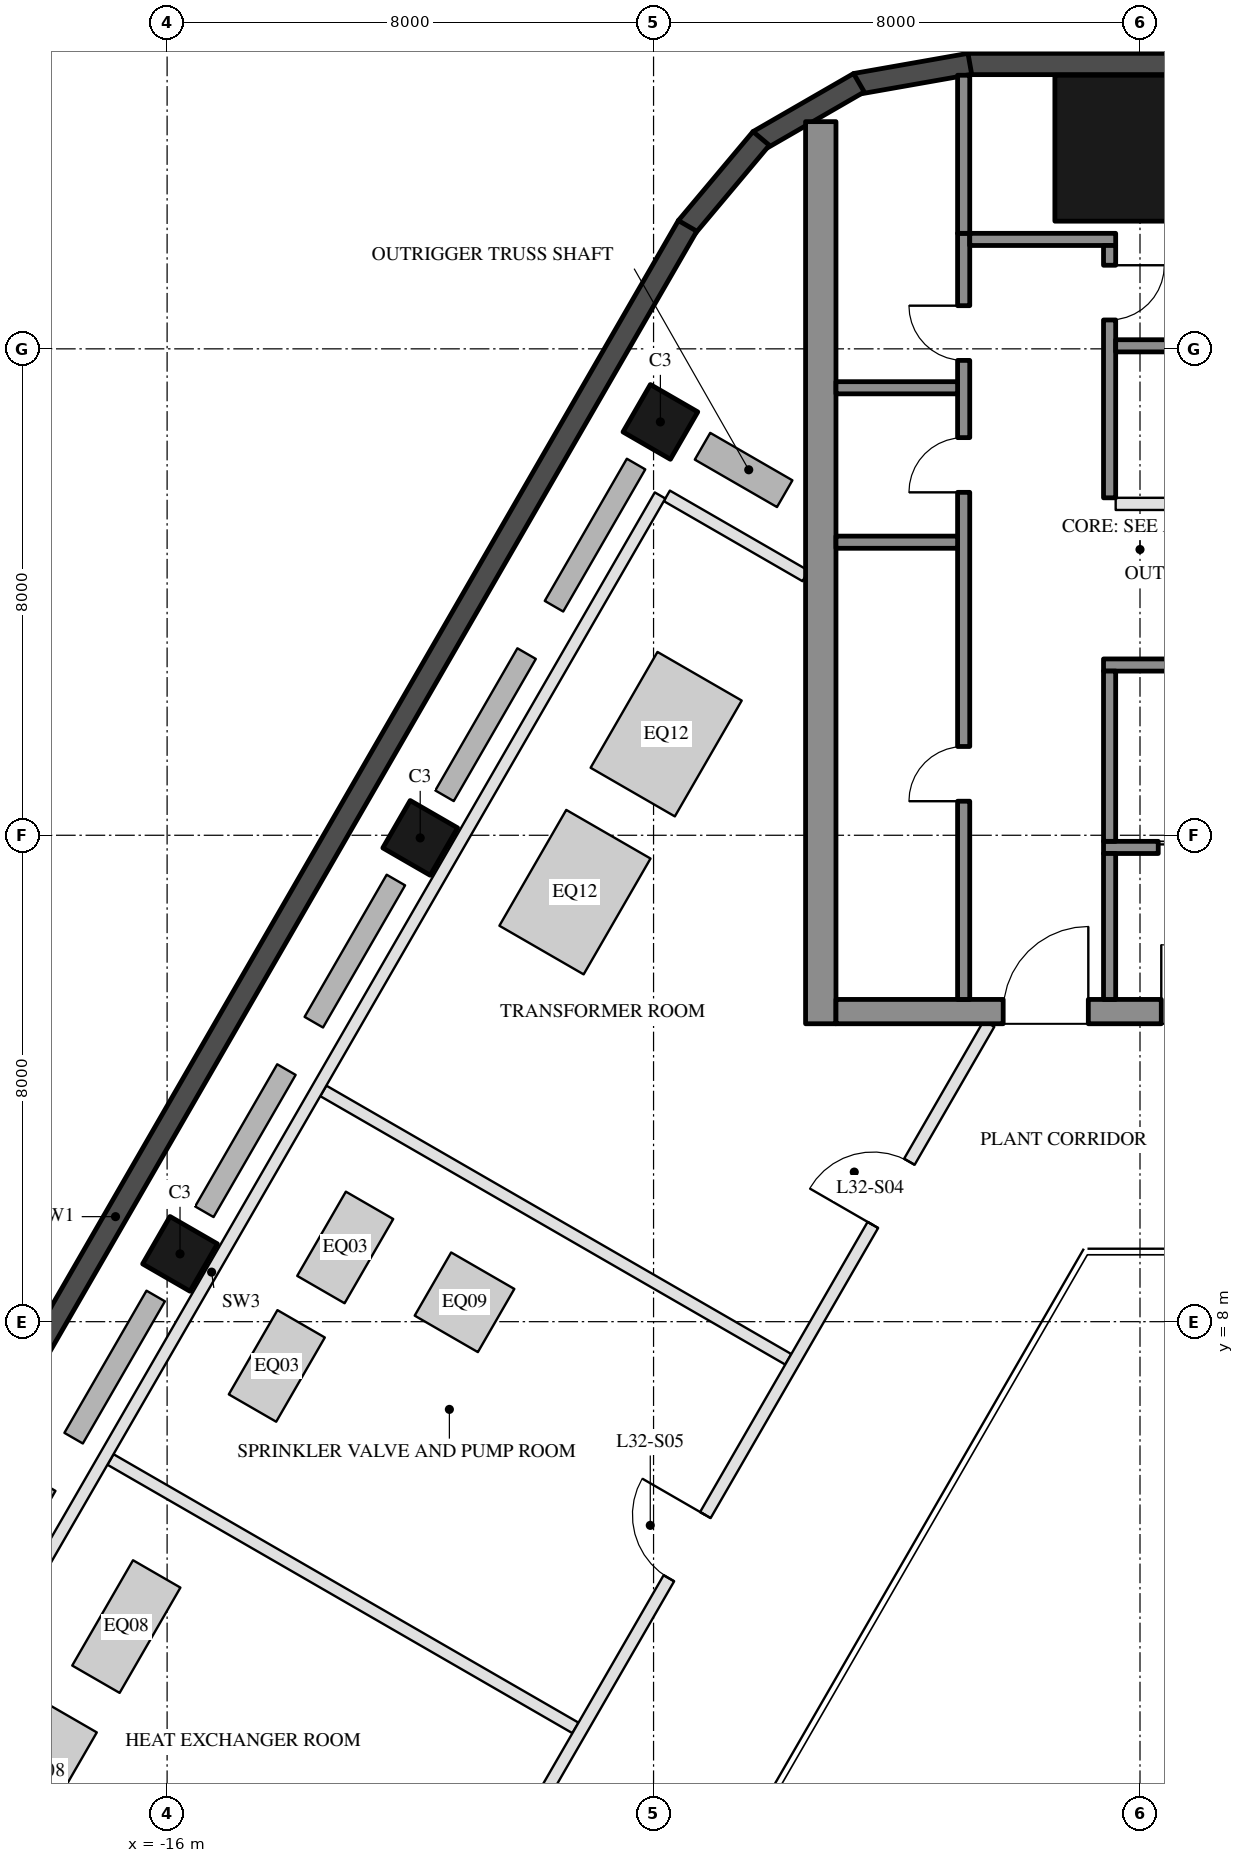
"""IFC4 building model, lengths in metres.
Left out: names, types, materials, properties, quantities, classifications, styles, units other than length and angle.
Written with IfcOpenShell. Run it as: python <this file> out.ifc"""

import sys

from ifc_helpers import new_model, si_unit, direction, frame, frame_2d, origin, origin_2d, place, context, subcontext, project, spatial, rectangle, hollow_rectangle, extrude, element, fill, save


model = new_model("IFC4")
c1 = context("Model", 3, precision=1e-05, world=origin(), true_north=direction((0.0, 1.0)))
c2 = subcontext(c1, "Body", "Model", "MODEL_VIEW")
j1 = project(units=[si_unit("LENGTHUNIT", "METRE"), si_unit("PLANEANGLEUNIT", "RADIAN")], contexts=[c1])
p1 = place(None, origin())
s1 = spatial("IfcSite", under=j1, at=p1, CompositionType="ELEMENT")
p2 = place(p1, origin())
s2 = spatial("IfcBuilding", under=s1, at=p2, CompositionType="ELEMENT")
p3 = place(p2, frame((0.0, 0.0, 137.6)))
s3 = spatial("IfcBuildingStorey", under=s2, at=p3, CompositionType="ELEMENT", Elevation=137.6)
for number, where, z_axis, x_axis in (
    (1, (-7.888, 22.798, 0.0), (0.0, 0.0, 1.0), (0.5, 0.866, 0.0)),
    (2, (-11.838, 15.957, 0.0), (0.0, 0.0, 1.0), (0.5, 0.866, 0.0)),
    (3, (-15.788, 9.115, 0.0), (0.0, 0.0, 1.0), (0.5, 0.866, 0.0)),
):
    element("IfcColumn", number, at=place(p3, frame(where, z_axis=z_axis, x_axis=x_axis)), inside=s3, PredefinedType="COLUMN", context=c2, shape_type="SweptSolid", body=[
        extrude(hollow_rectangle(XDim=0.9, YDim=0.9, WallThickness=0.04, at=origin_2d()), origin(), (0.0, 0.0, 1.0), 4.5),
    ])
p4 = place(p3, frame((0.0, 27.3, 0.0), z_axis=(0.0, 0.0, 1.0), x_axis=(1.0, 0.0, 0.0)))
e4 = element("IfcColumn", 4, at=p4, inside=s3, PredefinedType="COLUMN", context=c2, shape_type="SweptSolid", body=[
    extrude(hollow_rectangle(XDim=2.8, YDim=2.4, WallThickness=0.07, at=origin_2d()), origin(), (0.0, 0.0, 1.0), 4.5),
])
p5 = place(p3, frame((2.829, 28.685, 0.0), z_axis=(0.0, 0.0, 1.0), x_axis=(-1.0, 0.0, 0.0)))
e5 = element("IfcWall", 5, at=p5, inside=s3, PredefinedType="SOLIDWALL", context=c2, shape_type="SweptSolid", body=[
    extrude(rectangle(XDim=5.658, YDim=0.35, at=frame_2d((2.829, 0.0))), origin(), (0.0, 0.0, 1.0), 4.2),
])
for number, where, z_axis, x_axis in (
    (6, (-2.799, 28.688, 0.0), (0.0, 0.0, 1.0), (-0.985, -0.174, 0.0)),
    (7, (-4.623, 28.377, 0.0), (0.0, 0.0, 1.0), (-0.866, -0.5, 0.0)),
):
    element("IfcWall", number, at=place(p3, frame(where, z_axis=z_axis, x_axis=x_axis)), inside=s3, PredefinedType="SOLIDWALL", context=c2, shape_type="SweptSolid", body=[
        extrude(rectangle(XDim=1.91, YDim=0.35, at=frame_2d((0.955, 0.0))), origin(), (0.0, 0.0, 1.0), 4.2),
    ])
p6 = place(p3, frame((-6.23, 27.461, 0.0), z_axis=(0.0, 0.0, 1.0), x_axis=(-0.642808304945, -0.766027077259, 0.0)))
e8 = element("IfcWall", 8, at=p6, inside=s3, PredefinedType="SOLIDWALL", context=c2, shape_type="SweptSolid", body=[
    extrude(rectangle(XDim=1.91, YDim=0.35, at=frame_2d((0.955, 0.0))), origin(), (0.0, 0.0, 1.0), 4.2),
])
p7 = place(p3, frame((-7.441, 26.022, 0.0), z_axis=(0.0, 0.0, 1.0), x_axis=(-0.499998380999, -0.866026338513, 0.0)))
e9 = element("IfcWall", 9, at=p7, inside=s3, PredefinedType="SOLIDWALL", context=c2, shape_type="SweptSolid", body=[
    extrude(rectangle(XDim=37.631, YDim=0.35, at=frame_2d((18.816, 0.0))), origin(), (0.0, 0.0, 1.0), 4.2),
])
p8 = place(p3, frame((-5.25, 12.9, 0.0), z_axis=(0.0, 0.0, 1.0), x_axis=(0.0, 1.0, 0.0)))
e10 = element("IfcWall", 10, at=p8, inside=s3, PredefinedType="SHEAR", context=c2, shape_type="SweptSolid", body=[
    extrude(rectangle(XDim=14.837, YDim=0.5, at=frame_2d((7.418, 0.0))), origin(), (0.0, 0.0, 1.0), 4.2),
])
p9 = place(p3, frame((5.0, 13.1, 0.0), z_axis=(0.0, 0.0, 1.0), x_axis=(-1.0, 0.0, 0.0)))
e11 = element("IfcWall", 11, at=p9, inside=s3, PredefinedType="SHEAR", context=c2, shape_type="SweptSolid", body=[
    extrude(rectangle(XDim=10.0, YDim=0.4, at=frame_2d((5.0, 0.0))), origin(), (0.0, 0.0, 1.0), 4.2),
])
p10 = place(p9, frame((3.55, 0.0, 0.0)))
e12 = element("IfcOpeningElement", 12, at=p10, cuts=e11, PredefinedType="OPENING", context=c2, shape_type="SweptSolid", body=[
    extrude(rectangle(XDim=1.1, YDim=2.1, at=frame_2d((0.55, 1.05))), frame((0.0, 0.21, 0.0), z_axis=(0.0, -1.0, 0.0), x_axis=(1.0, 0.0, 0.0)), (0.0, 0.0, 1.0), 0.42),
])
p11 = place(p9, frame((5.85, 0.0, 0.0)))
e13 = element("IfcOpeningElement", 13, at=p11, cuts=e11, PredefinedType="OPENING", context=c2, shape_type="SweptSolid", body=[
    extrude(rectangle(XDim=1.4, YDim=2.1, at=frame_2d((0.7, 1.05))), frame((0.0, 0.21, 0.0), z_axis=(0.0, -1.0, 0.0), x_axis=(1.0, 0.0, 0.0)), (0.0, 0.0, 1.0), 0.42),
])
p12 = place(p3, frame((2.2, 18.8, 0.0), z_axis=(0.0, 0.0, 1.0), x_axis=(-1.0, 0.0, 0.0)))
e14 = element("IfcWall", 14, at=p12, inside=s3, PredefinedType="SHEAR", context=c2, shape_type="SweptSolid", body=[
    extrude(rectangle(XDim=2.8, YDim=0.2, at=frame_2d((1.4, 0.0))), origin(), (0.0, 0.0, 1.0), 4.2),
])
p13 = place(p3, frame((2.2, 15.8, 0.0), z_axis=(0.0, 0.0, 1.0), x_axis=(-1.0, 0.0, 0.0)))
e15 = element("IfcWall", 15, at=p13, inside=s3, PredefinedType="SHEAR", context=c2, shape_type="SweptSolid", body=[
    extrude(rectangle(XDim=2.8, YDim=0.2, at=frame_2d((1.4, 0.0))), origin(), (0.0, 0.0, 1.0), 4.2),
])
p14 = place(p13, frame((0.7, 0.0, 0.0)))
e16 = element("IfcOpeningElement", 16, at=p14, cuts=e15, PredefinedType="OPENING", context=c2, shape_type="SweptSolid", body=[
    extrude(rectangle(XDim=1.2, YDim=2.1, at=frame_2d((0.6, 1.05))), frame((0.0, 0.11, 0.0), z_axis=(0.0, -1.0, 0.0), x_axis=(1.0, 0.0, 0.0)), (0.0, 0.0, 1.0), 0.22),
])
p15 = place(p3, frame((-0.5, 15.9, 0.0), z_axis=(0.0, 0.0, 1.0), x_axis=(0.0, 1.0, 0.0)))
e17 = element("IfcWall", 17, at=p15, inside=s3, PredefinedType="SHEAR", context=c2, shape_type="SweptSolid", body=[
    extrude(rectangle(XDim=2.8, YDim=0.2, at=frame_2d((1.4, 0.0))), origin(), (0.0, 0.0, 1.0), 4.2),
])
p16 = place(p3, frame((-0.5, 13.3, 0.0), z_axis=(0.0, 0.0, 1.0), x_axis=(0.0, 1.0, 0.0)))
e18 = element("IfcWall", 18, at=p16, inside=s3, PredefinedType="SHEAR", context=c2, shape_type="SweptSolid", body=[
    extrude(rectangle(XDim=2.4, YDim=0.2, at=frame_2d((1.2, 0.0))), origin(), (0.0, 0.0, 1.0), 4.2),
])
p17 = place(p3, frame((-2.9, 13.3, 0.0), z_axis=(0.0, 0.0, 1.0), x_axis=(0.0, 1.0, 0.0)))
e19 = element("IfcWall", 19, at=p17, inside=s3, PredefinedType="SHEAR", context=c2, shape_type="SweptSolid", body=[
    extrude(rectangle(XDim=12.6, YDim=0.2, at=frame_2d((6.3, 0.0))), origin(), (0.0, 0.0, 1.0), 4.2),
])
p18 = place(p17, frame((3.26, 0.0, 0.0)))
e20 = element("IfcOpeningElement", 20, at=p18, cuts=e19, PredefinedType="OPENING", context=c2, shape_type="SweptSolid", body=[
    extrude(rectangle(XDim=0.9, YDim=2.1, at=frame_2d((0.45, 1.05))), frame((0.0, 0.11, 0.0), z_axis=(0.0, -1.0, 0.0), x_axis=(1.0, 0.0, 0.0)), (0.0, 0.0, 1.0), 0.22),
])
p19 = place(p17, frame((8.34, 0.0, 0.0)))
e21 = element("IfcOpeningElement", 21, at=p19, cuts=e19, PredefinedType="OPENING", context=c2, shape_type="SweptSolid", body=[
    extrude(rectangle(XDim=0.9, YDim=2.1, at=frame_2d((0.45, 1.05))), frame((0.0, 0.11, 0.0), z_axis=(0.0, -1.0, 0.0), x_axis=(1.0, 0.0, 0.0)), (0.0, 0.0, 1.0), 0.22),
])
p20 = place(p17, frame((10.51, 0.0, 0.0)))
e22 = element("IfcOpeningElement", 22, at=p20, cuts=e19, PredefinedType="OPENING", context=c2, shape_type="SweptSolid", body=[
    extrude(rectangle(XDim=0.9, YDim=2.1, at=frame_2d((0.45, 1.05))), frame((0.0, 0.11, 0.0), z_axis=(0.0, -1.0, 0.0), x_axis=(1.0, 0.0, 0.0)), (0.0, 0.0, 1.0), 0.22),
])
p21 = place(p3, frame((-0.4, 25.8, 0.0), z_axis=(0.0, 0.0, 1.0), x_axis=(-1.0, 0.0, 0.0)))
e23 = element("IfcWall", 23, at=p21, inside=s3, PredefinedType="SHEAR", context=c2, shape_type="SweptSolid", body=[
    extrude(rectangle(XDim=2.4, YDim=0.2, at=frame_2d((1.2, 0.0))), origin(), (0.0, 0.0, 1.0), 4.2),
])
p22 = place(p3, frame((-0.5, 21.55, 0.0), z_axis=(0.0, 0.0, 1.0), x_axis=(0.0, 1.0, 0.0)))
e24 = element("IfcWall", 24, at=p22, inside=s3, PredefinedType="SHEAR", context=c2, shape_type="SweptSolid", body=[
    extrude(rectangle(XDim=4.15, YDim=0.2, at=frame_2d((2.075, 0.0))), origin(), (0.0, 0.0, 1.0), 4.2),
])
p23 = place(p22, frame((2.925, 0.0, 0.0)))
e25 = element("IfcOpeningElement", 25, at=p23, cuts=e24, PredefinedType="OPENING", context=c2, shape_type="SweptSolid", body=[
    extrude(rectangle(XDim=0.9, YDim=2.1, at=frame_2d((0.45, 1.05))), frame((0.0, 0.11, 0.0), z_axis=(0.0, -1.0, 0.0), x_axis=(1.0, 0.0, 0.0)), (0.0, 0.0, 1.0), 0.22),
])
for number, where, z_axis, x_axis in (
    (26, (-3.0, 20.82, 0.0), (0.0, 0.0, 1.0), (-1.0, 0.0, 0.0)),
    (27, (-3.0, 23.36, 0.0), (0.0, 0.0, 1.0), (-1.0, 0.0, 0.0)),
):
    element("IfcWall", number, at=place(p3, frame(where, z_axis=z_axis, x_axis=x_axis)), inside=s3, PredefinedType="SHEAR", context=c2, shape_type="SweptSolid", body=[
        extrude(rectangle(XDim=2.0, YDim=0.2, at=frame_2d((1.0, 0.0))), origin(), (0.0, 0.0, 1.0), 4.2),
    ])
p24 = place(p3, frame((-2.9, 25.9, 0.0), z_axis=(0.0, 0.0, 1.0), x_axis=(0.0, 1.0, 0.0)))
e28 = element("IfcWall", 28, at=p24, inside=s3, PredefinedType="SHEAR", context=c2, shape_type="SweptSolid", body=[
    extrude(rectangle(XDim=2.6, YDim=0.2, at=frame_2d((1.3, 0.0))), origin(), (0.0, 0.0, 1.0), 4.2),
])
p25 = place(p3, frame((2.4, 24.05, 0.0), z_axis=(0.0, 0.0, 1.0), x_axis=(-1.0, 0.0, 0.0)))
e29 = element("IfcWall", 29, at=p25, inside=s3, PredefinedType="SHEAR", context=c2, shape_type="SweptSolid", body=[
    extrude(rectangle(XDim=2.8, YDim=0.2, at=frame_2d((1.4, 0.0))), origin(), (0.0, 0.0, 1.0), 4.2),
])
p26 = place(p3, frame((2.4, 21.45, 0.0), z_axis=(0.0, 0.0, 1.0), x_axis=(-1.0, 0.0, 0.0)))
e30 = element("IfcWall", 30, at=p26, inside=s3, PredefinedType="PARTITIONING", context=c2, shape_type="SweptSolid", body=[
    extrude(rectangle(XDim=2.8, YDim=0.2, at=frame_2d((1.4, 0.0))), origin(), (0.0, 0.0, 1.0), 4.2),
])
p27 = place(p3, frame((-7.781, 21.582, 0.0), z_axis=(0.0, 0.0, 1.0), x_axis=(0.865998849027, -0.500045991369, 0.0)))
e31 = element("IfcWall", 31, at=p27, inside=s3, PredefinedType="PARTITIONING", context=c2, shape_type="SweptSolid", body=[
    extrude(rectangle(XDim=2.635, YDim=0.2, at=frame_2d((1.317, 0.0))), origin(), (0.0, 0.0, 1.0), 4.2),
])
for number, where, z_axis, x_axis in (
    (32, (-13.431, 11.796, 0.0), (0.0, 0.0, 1.0), (0.866, -0.5, 0.0)),
    (33, (-16.931, 5.734, 0.0), (0.0, 0.0, 1.0), (0.866, -0.5, 0.0)),
):
    element("IfcWall", number, at=place(p3, frame(where, z_axis=z_axis, x_axis=x_axis)), inside=s3, PredefinedType="PARTITIONING", context=c2, shape_type="SweptSolid", body=[
        extrude(rectangle(XDim=8.83, YDim=0.2, at=frame_2d((4.415, 0.0))), origin(), (0.0, 0.0, 1.0), 4.2),
    ])
p28 = place(p3, frame((-7.893, 21.589, 0.0), z_axis=(0.0, 0.0, 1.0), x_axis=(-0.499998500593, -0.866026269466, 0.0)))
e34 = element("IfcWall", 34, at=p28, inside=s3, PredefinedType="PARTITIONING", context=c2, shape_type="SweptSolid", body=[
    extrude(rectangle(XDim=29.5, YDim=0.2, at=frame_2d((14.75, 0.0))), origin(), (0.0, 0.0, 1.0), 3.41),
])
p29 = place(p3, frame((-2.482, 12.9, 0.0), z_axis=(0.0, 0.0, 1.0), x_axis=(-0.50000478328, -0.866022642139, 0.0)))
e35 = element("IfcWall", 35, at=p29, inside=s3, PredefinedType="PARTITIONING", context=c2, shape_type="SweptSolid", body=[
    extrude(rectangle(XDim=19.861, YDim=0.2, at=frame_2d((9.931, 0.0))), origin(), (0.0, 0.0, 1.0), 3.41),
])
p30 = place(p29, frame((2.621, 0.0, 0.0)))
e36 = element("IfcOpeningElement", 36, at=p30, cuts=e35, PredefinedType="OPENING", context=c2, shape_type="SweptSolid", body=[
    extrude(rectangle(XDim=1.2, YDim=2.1, at=frame_2d((0.6, 1.05))), frame((0.0, 0.11, 0.0), z_axis=(0.0, -1.0, 0.0), x_axis=(1.0, 0.0, 0.0)), (0.0, 0.0, 1.0), 0.22),
])
p31 = place(p29, frame((9.331, 0.0, 0.0)))
e37 = element("IfcOpeningElement", 37, at=p31, cuts=e35, PredefinedType="OPENING", context=c2, shape_type="SweptSolid", body=[
    extrude(rectangle(XDim=1.2, YDim=2.1, at=frame_2d((0.6, 1.05))), frame((0.0, 0.11, 0.0), z_axis=(0.0, -1.0, 0.0), x_axis=(1.0, 0.0, 0.0)), (0.0, 0.0, 1.0), 0.22),
])
p32 = place(p29, frame((16.04, 0.0, 0.0)))
e38 = element("IfcOpeningElement", 38, at=p32, cuts=e35, PredefinedType="OPENING", context=c2, shape_type="SweptSolid", body=[
    extrude(rectangle(XDim=1.2, YDim=2.1, at=frame_2d((0.6, 1.05))), frame((0.0, 0.11, 0.0), z_axis=(0.0, -1.0, 0.0), x_axis=(1.0, 0.0, 0.0)), (0.0, 0.0, 1.0), 0.22),
])
p33 = place(p14, origin())
e39 = element("IfcDoor", 39, at=p33, inside=s3, OperationType="DOUBLE_DOOR_SLIDING", PredefinedType="DOOR", context=c2, shape_type="SweptSolid", body=[
    extrude(rectangle(XDim=1.2, YDim=2.1, at=frame_2d((0.6, 1.05))), frame((0.0, 0.025, 0.0), z_axis=(0.0, -1.0, 0.0), x_axis=(1.0, 0.0, 0.0)), (0.0, 0.0, 1.0), 0.05),
])
fill(e16, e39)
p34 = place(p18, origin())
e40 = element("IfcDoor", 40, at=p34, inside=s3, OperationType="SINGLE_SWING_LEFT", PredefinedType="DOOR", context=c2, shape_type="SweptSolid", body=[
    extrude(rectangle(XDim=0.9, YDim=2.1, at=frame_2d((0.45, 1.05))), frame((0.0, 0.025, 0.0), z_axis=(0.0, -1.0, 0.0), x_axis=(1.0, 0.0, 0.0)), (0.0, 0.0, 1.0), 0.05),
])
fill(e20, e40)
p35 = place(p19, origin())
e41 = element("IfcDoor", 41, at=p35, inside=s3, OperationType="SINGLE_SWING_LEFT", PredefinedType="DOOR", context=c2, shape_type="SweptSolid", body=[
    extrude(rectangle(XDim=0.9, YDim=2.1, at=frame_2d((0.45, 1.05))), frame((0.0, 0.025, 0.0), z_axis=(0.0, -1.0, 0.0), x_axis=(1.0, 0.0, 0.0)), (0.0, 0.0, 1.0), 0.05),
])
fill(e21, e41)
p36 = place(p20, origin())
e42 = element("IfcDoor", 42, at=p36, inside=s3, OperationType="SINGLE_SWING_RIGHT", PredefinedType="DOOR", context=c2, shape_type="SweptSolid", body=[
    extrude(rectangle(XDim=0.9, YDim=2.1, at=frame_2d((0.45, 1.05))), frame((0.0, 0.025, 0.0), z_axis=(0.0, -1.0, 0.0), x_axis=(1.0, 0.0, 0.0)), (0.0, 0.0, 1.0), 0.05),
])
fill(e22, e42)
p37 = place(p23, frame((0.9, 0.0, 0.0), z_axis=(0.0, 0.0, 1.0), x_axis=(-1.0, 0.0, 0.0)))
e43 = element("IfcDoor", 43, at=p37, inside=s3, OperationType="SINGLE_SWING_LEFT", PredefinedType="DOOR", context=c2, shape_type="SweptSolid", body=[
    extrude(rectangle(XDim=0.9, YDim=2.1, at=frame_2d((0.45, 1.05))), frame((0.0, 0.025, 0.0), z_axis=(0.0, -1.0, 0.0), x_axis=(1.0, 0.0, 0.0)), (0.0, 0.0, 1.0), 0.05),
])
fill(e25, e43)
p38 = place(p10, frame((1.1, 0.0, 0.0), z_axis=(0.0, 0.0, 1.0), x_axis=(-1.0, 0.0, 0.0)))
e44 = element("IfcDoor", 44, at=p38, inside=s3, OperationType="SINGLE_SWING_LEFT", PredefinedType="DOOR", context=c2, shape_type="SweptSolid", body=[
    extrude(rectangle(XDim=1.1, YDim=2.1, at=frame_2d((0.55, 1.05))), frame((0.0, 0.025, 0.0), z_axis=(0.0, -1.0, 0.0), x_axis=(1.0, 0.0, 0.0)), (0.0, 0.0, 1.0), 0.05),
])
fill(e12, e44)
p39 = place(p11, frame((1.4, 0.0, 0.0), z_axis=(0.0, 0.0, 1.0), x_axis=(-1.0, 0.0, 0.0)))
e45 = element("IfcDoor", 45, at=p39, inside=s3, OperationType="DOUBLE_DOOR_SINGLE_SWING", PredefinedType="DOOR", context=c2, shape_type="SweptSolid", body=[
    extrude(rectangle(XDim=1.4, YDim=2.1, at=frame_2d((0.7, 1.05))), frame((0.0, 0.025, 0.0), z_axis=(0.0, -1.0, 0.0), x_axis=(1.0, 0.0, 0.0)), (0.0, 0.0, 1.0), 0.05),
])
fill(e13, e45)
p40 = place(p30, frame((1.2, 0.0, 0.0), z_axis=(0.0, 0.0, 1.0), x_axis=(-1.0, 0.0, 0.0)))
e46 = element("IfcDoor", 46, at=p40, inside=s3, OperationType="SINGLE_SWING_LEFT", PredefinedType="DOOR", context=c2, shape_type="SweptSolid", body=[
    extrude(rectangle(XDim=1.2, YDim=2.1, at=frame_2d((0.6, 1.05))), frame((0.0, 0.025, 0.0), z_axis=(0.0, -1.0, 0.0), x_axis=(1.0, 0.0, 0.0)), (0.0, 0.0, 1.0), 0.05),
])
fill(e36, e46)
p41 = place(p31, frame((1.2, 0.0, 0.0), z_axis=(0.0, 0.0, 1.0), x_axis=(-1.0, 0.0, 0.0)))
e47 = element("IfcDoor", 47, at=p41, inside=s3, OperationType="SINGLE_SWING_RIGHT", PredefinedType="DOOR", context=c2, shape_type="SweptSolid", body=[
    extrude(rectangle(XDim=1.2, YDim=2.1, at=frame_2d((0.6, 1.05))), frame((0.0, 0.025, 0.0), z_axis=(0.0, -1.0, 0.0), x_axis=(1.0, 0.0, 0.0)), (0.0, 0.0, 1.0), 0.05),
])
fill(e37, e47)
save(model, sys.argv[1])
